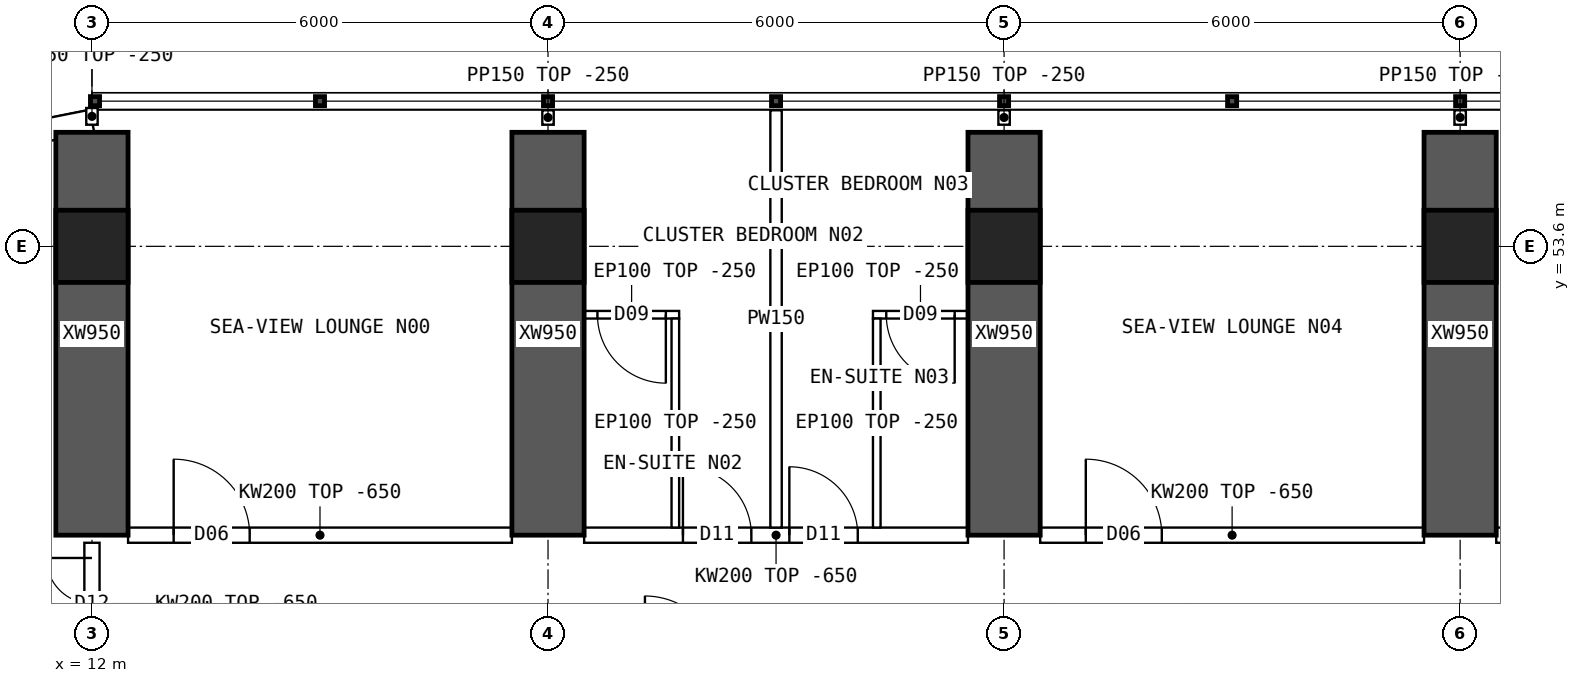
"""IFC4 building model, lengths in metres.
Left out: names, types, materials, properties, quantities, classifications, styles, units other than length and angle.
Written with IfcOpenShell. Run it as: python <this file> out.ifc"""

import sys

from ifc_helpers import new_model, si_unit, direction, frame, frame_2d, origin, origin_2d, place, context, subcontext, project, spatial, polyline, rectangle, hollow_rectangle, outline, extrude, element, fill, save


model = new_model("IFC4")
c1 = context("Model", 3, precision=1e-05, world=origin(), true_north=direction((0.0, 1.0)))
c2 = subcontext(c1, "Body", "Model", "MODEL_VIEW")
j1 = project(units=[si_unit("LENGTHUNIT", "METRE"), si_unit("PLANEANGLEUNIT", "RADIAN")], contexts=[c1])
p1 = place(None, origin())
s1 = spatial("IfcSite", under=j1, at=p1, CompositionType="ELEMENT")
p2 = place(p1, origin())
s2 = spatial("IfcBuilding", under=s1, at=p2, CompositionType="ELEMENT")
p3 = place(p2, frame((0.0, 0.0, 106.9)))
s3 = spatial("IfcBuildingStorey", under=s2, at=p3, CompositionType="ELEMENT", Elevation=106.9)
for number, where, z_axis, x_axis in (
    (1, (12.0, 53.6, 0.0), (0.0, 0.0, 1.0), (1.0, 0.0, 0.0)),
    (2, (18.0, 53.6, 0.0), (0.0, 0.0, 1.0), (1.0, 0.0, 0.0)),
    (3, (24.0, 53.6, 0.0), (0.0, 0.0, 1.0), (1.0, 0.0, 0.0)),
    (4, (30.0, 53.6, 0.0), (0.0, 0.0, 1.0), (1.0, 0.0, 0.0)),
):
    element("IfcColumn", number, at=place(p3, frame(where, z_axis=z_axis, x_axis=x_axis)), inside=s3, PredefinedType="COLUMN", context=c2, shape_type="SweptSolid", body=[
        extrude(hollow_rectangle(XDim=0.95, YDim=0.95, WallThickness=0.095, at=origin_2d()), origin(), (0.0, 0.0, 1.0), 3.75),
    ])
for number, where, z_axis, x_axis in (
    (5, (12.0, 49.8, 0.0), (0.0, 0.0, 1.0), (0.0, 1.0, 0.0)),
    (6, (18.0, 49.8, 0.0), (0.0, 0.0, 1.0), (0.0, 1.0, 0.0)),
    (7, (24.0, 49.8, 0.0), (0.0, 0.0, 1.0), (0.0, 1.0, 0.0)),
    (8, (30.0, 49.8, 0.0), (0.0, 0.0, 1.0), (0.0, 1.0, 0.0)),
):
    element("IfcWall", number, at=place(p3, frame(where, z_axis=z_axis, x_axis=x_axis)), inside=s3, PredefinedType="SHEAR", context=c2, shape_type="SweptSolid", body=[
        extrude(rectangle(XDim=5.3, YDim=0.95, at=frame_2d((2.65, 0.0))), origin(), (0.0, 0.0, 1.0), 3.75),
    ])
p4 = place(p3, frame((12.0, 55.25, 0.0), z_axis=(0.0, 0.0, 1.0), x_axis=(-0.980787251524, -0.195080412259, 0.0)))
e9 = element("IfcWall", 9, at=p4, inside=s3, PredefinedType="SOLIDWALL", context=c2, shape_type="SweptSolid", body=[
    extrude(outline(polyline([(-0.03, -0.15), (3.249, -0.15), (3.189, 0.15), (0.03, 0.15), (-0.03, -0.15)])), origin(), (0.0, 0.0, 1.0), 3.5),
])
p5 = place(p4, frame((0.909, 0.0, 0.9)))
e10 = element("IfcOpeningElement", 10, at=p5, cuts=e9, PredefinedType="OPENING", context=c2, shape_type="SweptSolid", body=[
    extrude(rectangle(XDim=1.4, YDim=1.8, at=frame_2d((0.7, 0.9))), frame((0.0, 0.16, 0.0), z_axis=(0.0, -1.0, 0.0), x_axis=(1.0, 0.0, 0.0)), (0.0, 0.0, 1.0), 0.32),
])
p6 = place(p3, frame((12.475, 49.8, 0.0), z_axis=(0.0, 0.0, 1.0), x_axis=(1.0, 0.0, 0.0)))
e11 = element("IfcWall", 11, at=p6, inside=s3, PredefinedType="SOLIDWALL", context=c2, shape_type="SweptSolid", body=[
    extrude(outline(polyline([(0.0, 0.0), (5.05, 0.0), (5.05, 3.1), (0.0, 3.1), (0.0, 0.0)])), frame((0.0, 0.1, 0.0), z_axis=(0.0, -1.0, 0.0), x_axis=(1.0, 0.0, 0.0)), (0.0, 0.0, 1.0), 0.2),
])
p7 = place(p6, frame((0.6, 0.0, 0.0)))
e12 = element("IfcOpeningElement", 12, at=p7, cuts=e11, PredefinedType="OPENING", context=c2, shape_type="SweptSolid", body=[
    extrude(rectangle(XDim=1.0, YDim=2.1, at=frame_2d((0.5, 1.05))), frame((0.0, 0.11, 0.0), z_axis=(0.0, -1.0, 0.0), x_axis=(1.0, 0.0, 0.0)), (0.0, 0.0, 1.0), 0.22),
])
p8 = place(p3, frame((18.475, 49.8, 0.0), z_axis=(0.0, 0.0, 1.0), x_axis=(1.0, 0.0, 0.0)))
e13 = element("IfcWall", 13, at=p8, inside=s3, PredefinedType="SOLIDWALL", context=c2, shape_type="SweptSolid", body=[
    extrude(outline(polyline([(0.0, 0.0), (5.05, 0.0), (5.05, 3.1), (0.0, 3.1), (0.0, 0.0)])), frame((0.0, 0.1, 0.0), z_axis=(0.0, -1.0, 0.0), x_axis=(1.0, 0.0, 0.0)), (0.0, 0.0, 1.0), 0.2),
])
p9 = place(p8, frame((1.3, 0.0, 0.0)))
e14 = element("IfcOpeningElement", 14, at=p9, cuts=e13, PredefinedType="OPENING", context=c2, shape_type="SweptSolid", body=[
    extrude(rectangle(XDim=0.9, YDim=2.1, at=frame_2d((0.45, 1.05))), frame((0.0, 0.11, 0.0), z_axis=(0.0, -1.0, 0.0), x_axis=(1.0, 0.0, 0.0)), (0.0, 0.0, 1.0), 0.22),
])
p10 = place(p8, frame((2.7, 0.0, 0.0)))
e15 = element("IfcOpeningElement", 15, at=p10, cuts=e13, PredefinedType="OPENING", context=c2, shape_type="SweptSolid", body=[
    extrude(rectangle(XDim=0.9, YDim=2.1, at=frame_2d((0.45, 1.05))), frame((0.0, 0.11, 0.0), z_axis=(0.0, -1.0, 0.0), x_axis=(1.0, 0.0, 0.0)), (0.0, 0.0, 1.0), 0.22),
])
p11 = place(p3, frame((24.475, 49.8, 0.0), z_axis=(0.0, 0.0, 1.0), x_axis=(1.0, 0.0, 0.0)))
e16 = element("IfcWall", 16, at=p11, inside=s3, PredefinedType="SOLIDWALL", context=c2, shape_type="SweptSolid", body=[
    extrude(outline(polyline([(0.0, 0.0), (5.05, 0.0), (5.05, 3.1), (0.0, 3.1), (0.0, 0.0)])), frame((0.0, 0.1, 0.0), z_axis=(0.0, -1.0, 0.0), x_axis=(1.0, 0.0, 0.0)), (0.0, 0.0, 1.0), 0.2),
])
p12 = place(p11, frame((0.6, 0.0, 0.0)))
e17 = element("IfcOpeningElement", 17, at=p12, cuts=e16, PredefinedType="OPENING", context=c2, shape_type="SweptSolid", body=[
    extrude(rectangle(XDim=1.0, YDim=2.1, at=frame_2d((0.5, 1.05))), frame((0.0, 0.11, 0.0), z_axis=(0.0, -1.0, 0.0), x_axis=(1.0, 0.0, 0.0)), (0.0, 0.0, 1.0), 0.22),
])
p13 = place(p3, frame((30.475, 49.8, 0.0), z_axis=(0.0, 0.0, 1.0), x_axis=(1.0, 0.0, 0.0)))
e18 = element("IfcWall", 18, at=p13, inside=s3, PredefinedType="SOLIDWALL", context=c2, shape_type="SweptSolid", body=[
    extrude(outline(polyline([(0.0, 0.0), (5.05, 0.0), (5.05, 3.1), (0.0, 3.1), (0.0, 0.0)])), frame((0.0, 0.1, 0.0), z_axis=(0.0, -1.0, 0.0), x_axis=(1.0, 0.0, 0.0)), (0.0, 0.0, 1.0), 0.2),
])
p14 = place(p13, frame((0.6, 0.0, 0.0)))
e19 = element("IfcOpeningElement", 19, at=p14, cuts=e18, PredefinedType="OPENING", context=c2, shape_type="SweptSolid", body=[
    extrude(rectangle(XDim=1.0, YDim=2.1, at=frame_2d((0.5, 1.05))), frame((0.0, 0.11, 0.0), z_axis=(0.0, -1.0, 0.0), x_axis=(1.0, 0.0, 0.0)), (0.0, 0.0, 1.0), 0.22),
])
p15 = place(p3, frame((21.0, 55.39, 0.0), z_axis=(0.0, 0.0, 1.0), x_axis=(0.0, -1.0, 0.0)))
e20 = element("IfcWall", 20, at=p15, inside=s3, PredefinedType="PARTITIONING", context=c2, shape_type="SweptSolid", body=[
    extrude(outline(polyline([(0.0, 0.0), (5.49, 0.0), (5.49, 3.1), (5.442, 3.1), (5.44, 3.5), (1.992, 3.5), (1.99, 3.1), (1.592, 3.1), (1.59, 3.5), (0.0, 3.5), (0.0, 0.0)])), frame((0.0, 0.075, 0.0), z_axis=(0.0, -1.0, 0.0), x_axis=(1.0, 0.0, 0.0)), (0.0, 0.0, 1.0), 0.15),
])
p16 = place(p3, frame((18.475, 52.7, 0.0), z_axis=(0.0, 0.0, 1.0), x_axis=(1.0, 0.0, 0.0)))
e21 = element("IfcWall", 21, at=p16, inside=s3, PredefinedType="PARTITIONING", context=c2, shape_type="SweptSolid", body=[
    extrude(rectangle(XDim=1.25, YDim=0.1, at=frame_2d((0.625, 0.0))), origin(), (0.0, 0.0, 1.0), 3.5),
])
p17 = place(p16, frame((0.175, 0.0, 0.0)))
e22 = element("IfcOpeningElement", 22, at=p17, cuts=e21, PredefinedType="OPENING", context=c2, shape_type="SweptSolid", body=[
    extrude(rectangle(XDim=0.9, YDim=2.1, at=frame_2d((0.45, 1.05))), frame((0.0, 0.06, 0.0), z_axis=(0.0, -1.0, 0.0), x_axis=(1.0, 0.0, 0.0)), (0.0, 0.0, 1.0), 0.12),
])
p18 = place(p3, frame((19.675, 52.65, 0.0), z_axis=(0.0, 0.0, 1.0), x_axis=(0.0, -1.0, 0.0)))
e23 = element("IfcWall", 23, at=p18, inside=s3, PredefinedType="PARTITIONING", context=c2, shape_type="SweptSolid", body=[
    extrude(outline(polyline([(0.0, 0.0), (2.75, 0.0), (2.75, 3.1), (2.702, 3.1), (2.7, 3.5), (0.0, 3.5), (0.0, 0.0)])), frame((0.0, 0.05, 0.0), z_axis=(0.0, -1.0, 0.0), x_axis=(1.0, 0.0, 0.0)), (0.0, 0.0, 1.0), 0.1),
])
p19 = place(p3, frame((22.275, 52.7, 0.0), z_axis=(0.0, 0.0, 1.0), x_axis=(1.0, 0.0, 0.0)))
e24 = element("IfcWall", 24, at=p19, inside=s3, PredefinedType="PARTITIONING", context=c2, shape_type="SweptSolid", body=[
    extrude(rectangle(XDim=1.25, YDim=0.1, at=frame_2d((0.625, 0.0))), origin(), (0.0, 0.0, 1.0), 3.5),
])
p20 = place(p19, frame((0.175, 0.0, 0.0)))
e25 = element("IfcOpeningElement", 25, at=p20, cuts=e24, PredefinedType="OPENING", context=c2, shape_type="SweptSolid", body=[
    extrude(rectangle(XDim=0.9, YDim=2.1, at=frame_2d((0.45, 1.05))), frame((0.0, 0.06, 0.0), z_axis=(0.0, -1.0, 0.0), x_axis=(1.0, 0.0, 0.0)), (0.0, 0.0, 1.0), 0.12),
])
p21 = place(p3, frame((22.325, 52.65, 0.0), z_axis=(0.0, 0.0, 1.0), x_axis=(0.0, -1.0, 0.0)))
e26 = element("IfcWall", 26, at=p21, inside=s3, PredefinedType="PARTITIONING", context=c2, shape_type="SweptSolid", body=[
    extrude(outline(polyline([(0.0, 0.0), (2.75, 0.0), (2.75, 3.1), (2.702, 3.1), (2.7, 3.5), (0.0, 3.5), (0.0, 0.0)])), frame((0.0, 0.05, 0.0), z_axis=(0.0, -1.0, 0.0), x_axis=(1.0, 0.0, 0.0)), (0.0, 0.0, 1.0), 0.1),
])
p22 = place(p3, frame((12.0, 48.1, 0.0), z_axis=(0.0, 0.0, 1.0), x_axis=(0.0, 1.0, 0.0)))
e27 = element("IfcWall", 27, at=p22, inside=s3, PredefinedType="SOLIDWALL", context=c2, shape_type="SweptSolid", body=[
    extrude(outline(polyline([(0.0, 0.0), (1.6, 0.0), (1.6, 3.1), (0.0, 3.1), (0.0, 0.0)])), frame((0.0, 0.1, 0.0), z_axis=(0.0, -1.0, 0.0), x_axis=(1.0, 0.0, 0.0)), (0.0, 0.0, 1.0), 0.2),
])
p23 = place(p22, frame((0.2, 0.0, 0.0)))
e28 = element("IfcOpeningElement", 28, at=p23, cuts=e27, PredefinedType="OPENING", context=c2, shape_type="SweptSolid", body=[
    extrude(rectangle(XDim=1.2, YDim=2.1, at=frame_2d((0.6, 1.05))), frame((0.0, 0.11, 0.0), z_axis=(0.0, -1.0, 0.0), x_axis=(1.0, 0.0, 0.0)), (0.0, 0.0, 1.0), 0.22),
])
p24 = place(p3, frame((12.0, 55.2, 0.0), z_axis=(0.0, 0.0, 1.0), x_axis=(0.0, 1.0, 0.0)))
e29 = element("IfcWall", 29, at=p24, inside=s3, PredefinedType="PARTITIONING", context=c2, shape_type="SweptSolid", body=[
    extrude(rectangle(XDim=0.22, YDim=0.15, at=frame_2d((0.11, 0.0))), origin(), (0.0, 0.0, 1.0), 3.5),
])
for number, where, z_axis, x_axis in (
    (30, (18.0, 55.2, 0.0), (0.0, 0.0, 1.0), (0.0, 1.0, 0.0)),
    (31, (24.0, 55.2, 0.0), (0.0, 0.0, 1.0), (0.0, 1.0, 0.0)),
    (32, (30.0, 55.2, 0.0), (0.0, 0.0, 1.0), (0.0, 1.0, 0.0)),
):
    element("IfcWall", number, at=place(p3, frame(where, z_axis=z_axis, x_axis=x_axis)), inside=s3, PredefinedType="PARTITIONING", context=c2, shape_type="SweptSolid", body=[
        extrude(rectangle(XDim=0.19, YDim=0.15, at=frame_2d((0.095, 0.0))), origin(), (0.0, 0.0, 1.0), 3.5),
    ])
p25 = place(p7, origin())
e33 = element("IfcDoor", 33, at=p25, inside=s3, OperationType="SINGLE_SWING_LEFT", PredefinedType="DOOR", context=c2, shape_type="SweptSolid", body=[
    extrude(rectangle(XDim=1.0, YDim=2.1, at=frame_2d((0.5, 1.05))), frame((0.0, 0.025, 0.0), z_axis=(0.0, -1.0, 0.0), x_axis=(1.0, 0.0, 0.0)), (0.0, 0.0, 1.0), 0.05),
])
fill(e12, e33)
p26 = place(p17, origin())
e34 = element("IfcDoor", 34, at=p26, inside=s3, OperationType="SINGLE_SWING_RIGHT", PredefinedType="DOOR", context=c2, shape_type="SweptSolid", body=[
    extrude(rectangle(XDim=0.9, YDim=2.1, at=frame_2d((0.45, 1.05))), frame((0.0, 0.025, 0.0), z_axis=(0.0, -1.0, 0.0), x_axis=(1.0, 0.0, 0.0)), (0.0, 0.0, 1.0), 0.05),
])
fill(e22, e34)
p27 = place(p9, origin())
e35 = element("IfcDoor", 35, at=p27, inside=s3, OperationType="SINGLE_SWING_LEFT", PredefinedType="DOOR", context=c2, shape_type="SweptSolid", body=[
    extrude(rectangle(XDim=0.9, YDim=2.1, at=frame_2d((0.45, 1.05))), frame((0.0, 0.025, 0.0), z_axis=(0.0, -1.0, 0.0), x_axis=(1.0, 0.0, 0.0)), (0.0, 0.0, 1.0), 0.05),
])
fill(e14, e35)
p28 = place(p20, origin())
e36 = element("IfcDoor", 36, at=p28, inside=s3, OperationType="SINGLE_SWING_RIGHT", PredefinedType="DOOR", context=c2, shape_type="SweptSolid", body=[
    extrude(rectangle(XDim=0.9, YDim=2.1, at=frame_2d((0.45, 1.05))), frame((0.0, 0.025, 0.0), z_axis=(0.0, -1.0, 0.0), x_axis=(1.0, 0.0, 0.0)), (0.0, 0.0, 1.0), 0.05),
])
fill(e25, e36)
p29 = place(p10, origin())
e37 = element("IfcDoor", 37, at=p29, inside=s3, OperationType="SINGLE_SWING_LEFT", PredefinedType="DOOR", context=c2, shape_type="SweptSolid", body=[
    extrude(rectangle(XDim=0.9, YDim=2.1, at=frame_2d((0.45, 1.05))), frame((0.0, 0.025, 0.0), z_axis=(0.0, -1.0, 0.0), x_axis=(1.0, 0.0, 0.0)), (0.0, 0.0, 1.0), 0.05),
])
fill(e15, e37)
p30 = place(p12, origin())
e38 = element("IfcDoor", 38, at=p30, inside=s3, OperationType="SINGLE_SWING_LEFT", PredefinedType="DOOR", context=c2, shape_type="SweptSolid", body=[
    extrude(rectangle(XDim=1.0, YDim=2.1, at=frame_2d((0.5, 1.05))), frame((0.0, 0.025, 0.0), z_axis=(0.0, -1.0, 0.0), x_axis=(1.0, 0.0, 0.0)), (0.0, 0.0, 1.0), 0.05),
])
fill(e17, e38)
p31 = place(p23, origin())
e39 = element("IfcDoor", 39, at=p31, inside=s3, OperationType="DOUBLE_DOOR_SINGLE_SWING", PredefinedType="DOOR", context=c2, shape_type="SweptSolid", body=[
    extrude(rectangle(XDim=1.2, YDim=2.1, at=frame_2d((0.6, 1.05))), frame((0.0, 0.025, 0.0), z_axis=(0.0, -1.0, 0.0), x_axis=(1.0, 0.0, 0.0)), (0.0, 0.0, 1.0), 0.05),
])
fill(e28, e39)
save(model, sys.argv[1])
